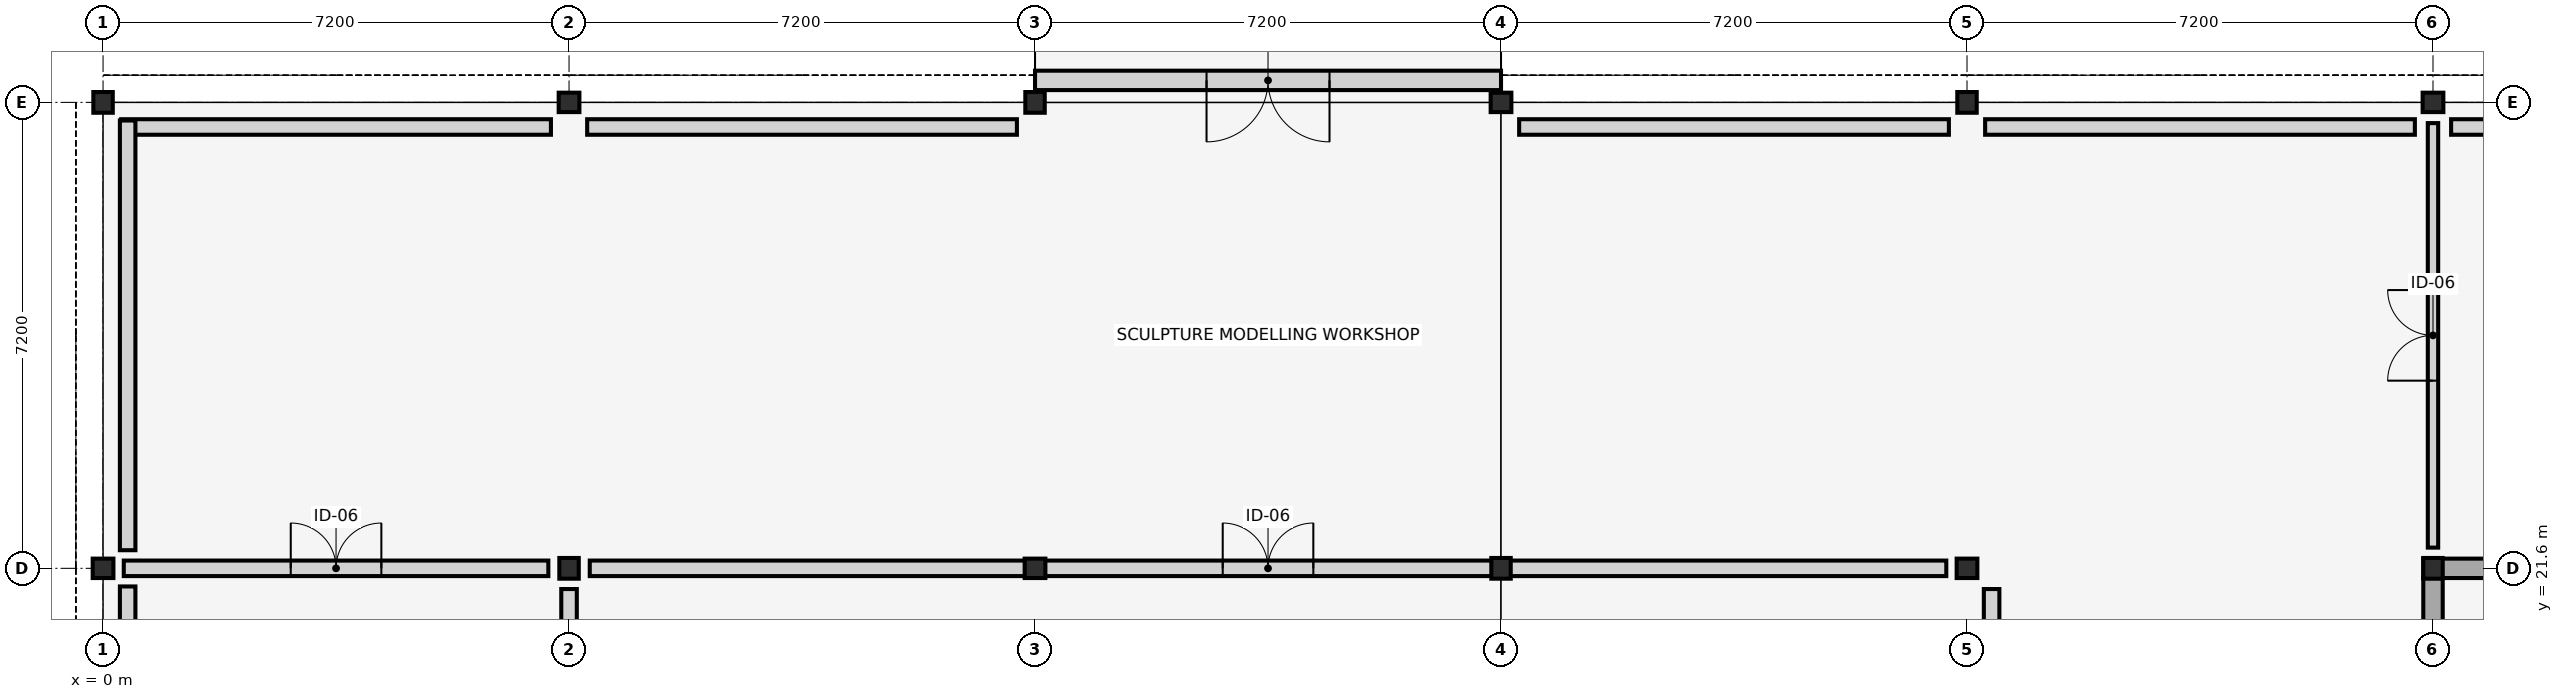
"""IFC4 building model, lengths in metres.
Left out: names, types, materials, properties, quantities, classifications, styles, units other than length and angle.
Written with IfcOpenShell. Run it as: python <this file> out.ifc"""

import sys

from ifc_helpers import new_model, si_unit, direction, frame, frame_2d, origin, origin_2d, place, context, subcontext, project, spatial, rectangle, i_section, extrude, element, fill, save


model = new_model("IFC4")
c1 = context("Model", 3, precision=1e-05, world=origin(), true_north=direction((0.0, 1.0)))
c2 = subcontext(c1, "Body", "Model", "MODEL_VIEW")
j1 = project(units=[si_unit("LENGTHUNIT", "METRE"), si_unit("PLANEANGLEUNIT", "RADIAN")], contexts=[c1])
p1 = place(None, origin())
s1 = spatial("IfcSite", under=j1, at=p1, CompositionType="ELEMENT")
p2 = place(p1, origin())
s2 = spatial("IfcBuilding", under=s1, at=p2, CompositionType="ELEMENT")
p3 = place(p2, frame((0.0, 0.0, 4.5)))
s3 = spatial("IfcBuildingStorey", under=s2, at=p3, CompositionType="ELEMENT", Elevation=4.5)
for number, where, z_axis, x_axis in (
    (1, (0.0, 21.6, 0.0), (0.0, 0.0, 1.0), (0.0, 1.0, 0.0)),
    (2, (0.0, 28.8, 0.0), (0.0, 0.0, 1.0), (1.0, 0.0, 0.0)),
    (3, (7.2, 21.6, 0.0), (0.0, 0.0, 1.0), (1.0, 0.0, 0.0)),
    (4, (7.2, 28.8, 0.0), (0.0, 0.0, 1.0), (0.0, 1.0, 0.0)),
    (5, (14.4, 21.6, 0.0), (0.0, 0.0, 1.0), (0.0, 1.0, 0.0)),
    (6, (14.4, 28.8, 0.0), (0.0, 0.0, 1.0), (1.0, 0.0, 0.0)),
    (7, (21.6, 21.6, 0.0), (0.0, 0.0, 1.0), (1.0, 0.0, 0.0)),
    (8, (21.6, 28.8, 0.0), (0.0, 0.0, 1.0), (0.0, 1.0, 0.0)),
    (9, (28.8, 21.6, 0.0), (0.0, 0.0, 1.0), (0.0, 1.0, 0.0)),
    (10, (28.8, 28.8, 0.0), (0.0, 0.0, 1.0), (1.0, 0.0, 0.0)),
    (11, (36.0, 21.6, 0.0), (0.0, 0.0, 1.0), (1.0, 0.0, 0.0)),
    (12, (36.0, 28.8, 0.0), (0.0, 0.0, 1.0), (0.0, 1.0, 0.0)),
):
    element("IfcColumn", number, at=place(p3, frame(where, z_axis=z_axis, x_axis=x_axis)), inside=s3, PredefinedType="COLUMN", context=c2, shape_type="SweptSolid", body=[
        extrude(i_section(OverallWidth=0.3, OverallDepth=0.32, WebThickness=0.011, FlangeThickness=0.021, FilletRadius=0.027, at=origin_2d()), origin(), (0.0, 0.0, 1.0), 4.2),
    ])
for number, where, z_axis, x_axis in (
    (13, (42.92, 28.42, 0.0), (0.0, 0.0, 1.0), (-1.0, 0.0, 0.0)),
    (14, (35.72, 28.42, 0.0), (0.0, 0.0, 1.0), (-1.0, 0.0, 0.0)),
):
    element("IfcWall", number, at=place(p3, frame(where, z_axis=z_axis, x_axis=x_axis)), inside=s3, PredefinedType="STANDARD", context=c2, shape_type="SweptSolid", body=[
        extrude(rectangle(XDim=6.64, YDim=0.24, at=frame_2d((3.32, 0.0))), origin(), (0.0, 0.0, 1.0), 3.58),
    ])
p4 = place(p3, frame((28.52, 28.42, 0.0), z_axis=(0.0, 0.0, 1.0), x_axis=(-1.0, 0.0, 0.0)))
e15 = element("IfcWall", 15, at=p4, inside=s3, PredefinedType="STANDARD", context=c2, shape_type="SweptSolid", body=[
    extrude(rectangle(XDim=6.64, YDim=0.24, at=frame_2d((3.32, 0.0))), origin(), (0.0, 0.0, 1.0), 3.58),
])
p5 = place(p3, frame((21.6, 29.14, 0.0), z_axis=(0.0, 0.0, 1.0), x_axis=(-1.0, 0.0, 0.0)))
e16 = element("IfcWall", 16, at=p5, inside=s3, PredefinedType="STANDARD", context=c2, shape_type="SweptSolid", body=[
    extrude(rectangle(XDim=7.2, YDim=0.3, at=frame_2d((3.6, 0.0))), origin(), (0.0, 0.0, 1.0), 3.65),
])
p6 = place(p5, frame((2.65, 0.0, 0.0)))
e17 = element("IfcOpeningElement", 17, at=p6, cuts=e16, PredefinedType="OPENING", context=c2, shape_type="SweptSolid", body=[
    extrude(rectangle(XDim=1.9, YDim=2.45, at=frame_2d((0.95, 1.225))), frame((0.0, 0.16, 0.0), z_axis=(0.0, -1.0, 0.0), x_axis=(1.0, 0.0, 0.0)), (0.0, 0.0, 1.0), 0.32),
])
p7 = place(p3, frame((14.12, 28.42, 0.0), z_axis=(0.0, 0.0, 1.0), x_axis=(-1.0, 0.0, 0.0)))
e18 = element("IfcWall", 18, at=p7, inside=s3, PredefinedType="STANDARD", context=c2, shape_type="SweptSolid", body=[
    extrude(rectangle(XDim=6.64, YDim=0.24, at=frame_2d((3.32, 0.0))), origin(), (0.0, 0.0, 1.0), 3.58),
])
p8 = place(p3, frame((6.92, 28.42, 0.0), z_axis=(0.0, 0.0, 1.0), x_axis=(-1.0, 0.0, 0.0)))
e19 = element("IfcWall", 19, at=p8, inside=s3, PredefinedType="STANDARD", context=c2, shape_type="SweptSolid", body=[
    extrude(rectangle(XDim=6.64, YDim=0.24, at=frame_2d((3.32, 0.0))), origin(), (0.0, 0.0, 1.0), 3.58),
])
for number, where, z_axis, x_axis in (
    (20, (0.38, 28.52, 0.0), (0.0, 0.0, 1.0), (0.0, -1.0, 0.0)),
    (21, (0.38, 21.32, 0.0), (0.0, 0.0, 1.0), (0.0, -1.0, 0.0)),
):
    element("IfcWall", number, at=place(p3, frame(where, z_axis=z_axis, x_axis=x_axis)), inside=s3, PredefinedType="STANDARD", context=c2, shape_type="SweptSolid", body=[
        extrude(rectangle(XDim=6.64, YDim=0.24, at=frame_2d((3.32, 0.0))), origin(), (0.0, 0.0, 1.0), 3.58),
    ])
p9 = place(p3, frame((35.85, 21.6, 0.0), z_axis=(0.0, 0.0, 1.0), x_axis=(1.0, 0.0, 0.0)))
e22 = element("IfcWall", 22, at=p9, inside=s3, PredefinedType="SHEAR", context=c2, shape_type="SweptSolid", body=[
    extrude(rectangle(XDim=7.35, YDim=0.3, at=frame_2d((3.675, 0.0))), origin(), (0.0, 0.0, 1.0), 3.98),
])
p10 = place(p3, frame((36.0, 7.35, 0.0), z_axis=(0.0, 0.0, 1.0), x_axis=(0.0, 1.0, 0.0)))
e23 = element("IfcWall", 23, at=p10, inside=s3, PredefinedType="SHEAR", context=c2, shape_type="SweptSolid", body=[
    extrude(rectangle(XDim=14.1, YDim=0.3, at=frame_2d((7.05, 0.0))), origin(), (0.0, 0.0, 1.0), 3.98),
])
p11 = place(p10, frame((3.55, 0.0, 0.0)))
e24 = element("IfcOpeningElement", 24, at=p11, cuts=e23, PredefinedType="OPENING", context=c2, shape_type="SweptSolid", body=[
    extrude(rectangle(XDim=1.3, YDim=2.2, at=frame_2d((0.65, 1.1))), frame((0.0, 0.16, 0.0), z_axis=(0.0, -1.0, 0.0), x_axis=(1.0, 0.0, 0.0)), (0.0, 0.0, 1.0), 0.32),
])
p12 = place(p10, frame((7.85, 0.0, 0.0)))
e25 = element("IfcOpeningElement", 25, at=p12, cuts=e23, PredefinedType="OPENING", context=c2, shape_type="SweptSolid", body=[
    extrude(rectangle(XDim=1.05, YDim=2.15, at=frame_2d((0.525, 1.075))), frame((0.0, 0.16, 0.0), z_axis=(0.0, -1.0, 0.0), x_axis=(1.0, 0.0, 0.0)), (0.0, 0.0, 1.0), 0.32),
])
p13 = place(p10, frame((10.55, 0.0, 0.0)))
e26 = element("IfcOpeningElement", 26, at=p13, cuts=e23, PredefinedType="OPENING", context=c2, shape_type="SweptSolid", body=[
    extrude(rectangle(XDim=1.0, YDim=2.15, at=frame_2d((0.5, 1.075))), frame((0.0, 0.16, 0.0), z_axis=(0.0, -1.0, 0.0), x_axis=(1.0, 0.0, 0.0)), (0.0, 0.0, 1.0), 0.32),
])
p14 = place(p3, frame((7.2, 7.52, 0.0), z_axis=(0.0, 0.0, 1.0), x_axis=(0.0, 1.0, 0.0)))
e27 = element("IfcWall", 27, at=p14, inside=s3, PredefinedType="PARTITIONING", context=c2, shape_type="SweptSolid", body=[
    extrude(rectangle(XDim=13.76, YDim=0.24, at=frame_2d((6.88, 0.0))), origin(), (0.0, 0.0, 1.0), 3.15),
])
p15 = place(p14, frame((1.802, 0.0, 0.0)))
e28 = element("IfcOpeningElement", 28, at=p15, cuts=e27, PredefinedType="OPENING", context=c2, shape_type="SweptSolid", body=[
    extrude(rectangle(XDim=1.4, YDim=2.3, at=frame_2d((0.7, 1.15))), frame((0.0, 0.13, 0.0), z_axis=(0.0, -1.0, 0.0), x_axis=(1.0, 0.0, 0.0)), (0.0, 0.0, 1.0), 0.26),
])
p16 = place(p3, frame((7.52, 21.6, 0.0), z_axis=(0.0, 0.0, 1.0), x_axis=(1.0, 0.0, 0.0)))
e29 = element("IfcWall", 29, at=p16, inside=s3, PredefinedType="PARTITIONING", context=c2, shape_type="SweptSolid", body=[
    extrude(rectangle(XDim=20.96, YDim=0.24, at=frame_2d((10.48, 0.0))), origin(), (0.0, 0.0, 1.0), 3.15),
])
p17 = place(p16, frame((9.78, 0.0, 0.0)))
e30 = element("IfcOpeningElement", 30, at=p17, cuts=e29, PredefinedType="OPENING", context=c2, shape_type="SweptSolid", body=[
    extrude(rectangle(XDim=1.4, YDim=2.3, at=frame_2d((0.7, 1.15))), frame((0.0, 0.13, 0.0), z_axis=(0.0, -1.0, 0.0), x_axis=(1.0, 0.0, 0.0)), (0.0, 0.0, 1.0), 0.26),
])
p18 = place(p3, frame((29.18, 7.52, 0.0), z_axis=(0.0, 0.0, 1.0), x_axis=(0.0, 1.0, 0.0)))
e31 = element("IfcWall", 31, at=p18, inside=s3, PredefinedType="PARTITIONING", context=c2, shape_type="SweptSolid", body=[
    extrude(rectangle(XDim=13.76, YDim=0.24, at=frame_2d((6.88, 0.0))), origin(), (0.0, 0.0, 1.0), 3.15),
])
p19 = place(p18, frame((1.802, 0.0, 0.0)))
e32 = element("IfcOpeningElement", 32, at=p19, cuts=e31, PredefinedType="OPENING", context=c2, shape_type="SweptSolid", body=[
    extrude(rectangle(XDim=1.4, YDim=2.3, at=frame_2d((0.7, 1.15))), frame((0.0, 0.13, 0.0), z_axis=(0.0, -1.0, 0.0), x_axis=(1.0, 0.0, 0.0)), (0.0, 0.0, 1.0), 0.26),
])
p20 = place(p3, frame((0.32, 21.6, 0.0), z_axis=(0.0, 0.0, 1.0), x_axis=(1.0, 0.0, 0.0)))
e33 = element("IfcWall", 33, at=p20, inside=s3, PredefinedType="PARTITIONING", context=c2, shape_type="SweptSolid", body=[
    extrude(rectangle(XDim=6.56, YDim=0.24, at=frame_2d((3.28, 0.0))), origin(), (0.0, 0.0, 1.0), 3.15),
])
p21 = place(p20, frame((2.58, 0.0, 0.0)))
e34 = element("IfcOpeningElement", 34, at=p21, cuts=e33, PredefinedType="OPENING", context=c2, shape_type="SweptSolid", body=[
    extrude(rectangle(XDim=1.4, YDim=2.3, at=frame_2d((0.7, 1.15))), frame((0.0, 0.13, 0.0), z_axis=(0.0, -1.0, 0.0), x_axis=(1.0, 0.0, 0.0)), (0.0, 0.0, 1.0), 0.26),
])
p22 = place(p3, frame((36.0, 21.92, 0.0), z_axis=(0.0, 0.0, 1.0), x_axis=(0.0, 1.0, 0.0)))
e35 = element("IfcWall", 35, at=p22, inside=s3, PredefinedType="PARTITIONING", context=c2, shape_type="SweptSolid", body=[
    extrude(rectangle(XDim=6.56, YDim=0.16, at=frame_2d((3.28, 0.0))), origin(), (0.0, 0.0, 1.0), 3.15),
])
p23 = place(p22, frame((2.58, 0.0, 0.0)))
e36 = element("IfcOpeningElement", 36, at=p23, cuts=e35, PredefinedType="OPENING", context=c2, shape_type="SweptSolid", body=[
    extrude(rectangle(XDim=1.4, YDim=2.3, at=frame_2d((0.7, 1.15))), frame((0.0, 0.09, 0.0), z_axis=(0.0, -1.0, 0.0), x_axis=(1.0, 0.0, 0.0)), (0.0, 0.0, 1.0), 0.18),
])
p24 = place(p6, origin())
e37 = element("IfcDoor", 37, at=p24, inside=s3, OperationType="DOUBLE_DOOR_SINGLE_SWING", PredefinedType="DOOR", context=c2, shape_type="SweptSolid", body=[
    extrude(rectangle(XDim=1.9, YDim=2.45, at=frame_2d((0.95, 1.225))), frame((0.0, 0.025, 0.0), z_axis=(0.0, -1.0, 0.0), x_axis=(1.0, 0.0, 0.0)), (0.0, 0.0, 1.0), 0.05),
])
fill(e17, e37)
p25 = place(p17, origin())
e38 = element("IfcDoor", 38, at=p25, inside=s3, OperationType="DOUBLE_DOOR_SINGLE_SWING", PredefinedType="DOOR", context=c2, shape_type="SweptSolid", body=[
    extrude(rectangle(XDim=1.4, YDim=2.3, at=frame_2d((0.7, 1.15))), frame((0.0, 0.025, 0.0), z_axis=(0.0, -1.0, 0.0), x_axis=(1.0, 0.0, 0.0)), (0.0, 0.0, 1.0), 0.05),
])
fill(e30, e38)
p26 = place(p21, origin())
e39 = element("IfcDoor", 39, at=p26, inside=s3, OperationType="DOUBLE_DOOR_SINGLE_SWING", PredefinedType="DOOR", context=c2, shape_type="SweptSolid", body=[
    extrude(rectangle(XDim=1.4, YDim=2.3, at=frame_2d((0.7, 1.15))), frame((0.0, 0.025, 0.0), z_axis=(0.0, -1.0, 0.0), x_axis=(1.0, 0.0, 0.0)), (0.0, 0.0, 1.0), 0.05),
])
fill(e34, e39)
p27 = place(p23, origin())
e40 = element("IfcDoor", 40, at=p27, inside=s3, OperationType="DOUBLE_DOOR_SINGLE_SWING", PredefinedType="DOOR", context=c2, shape_type="SweptSolid", body=[
    extrude(rectangle(XDim=1.4, YDim=2.3, at=frame_2d((0.7, 1.15))), frame((0.0, 0.025, 0.0), z_axis=(0.0, -1.0, 0.0), x_axis=(1.0, 0.0, 0.0)), (0.0, 0.0, 1.0), 0.05),
])
fill(e36, e40)
save(model, sys.argv[1])
